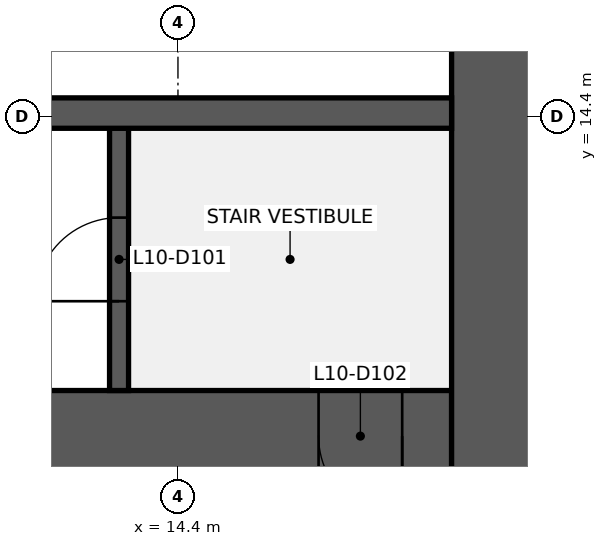
"""IFC4 building model, lengths in metres.
Left out: names, types, materials, properties, quantities, classifications, styles, units other than length and angle.
Written with IfcOpenShell. Run it as: python <this file> out.ifc"""

import sys

from ifc_helpers import new_model, si_unit, direction, frame, frame_2d, origin, place, context, subcontext, project, spatial, rectangle, extrude, element, fill, save


model = new_model("IFC4")
c1 = context("Model", 3, precision=1e-05, world=origin(), true_north=direction((0.0, 1.0)))
c2 = subcontext(c1, "Body", "Model", "MODEL_VIEW")
j1 = project(units=[si_unit("LENGTHUNIT", "METRE"), si_unit("PLANEANGLEUNIT", "RADIAN")], contexts=[c1])
p1 = place(None, origin())
s1 = spatial("IfcSite", under=j1, at=p1, CompositionType="ELEMENT")
p2 = place(p1, origin())
s2 = spatial("IfcBuilding", under=s1, at=p2, CompositionType="ELEMENT")
p3 = place(p2, frame((0.0, 0.0, 51.0)))
s3 = spatial("IfcBuildingStorey", under=s2, at=p3, CompositionType="ELEMENT", Elevation=51.0)
p4 = place(p3, frame((18.0, 10.2, 0.0), z_axis=(0.0, 0.0, 1.0), x_axis=(-1.0, 0.0, 0.0)))
e1 = element("IfcWall", 1, at=p4, inside=s3, PredefinedType="SHEAR", context=c2, shape_type="SweptSolid", body=[
    extrude(rectangle(XDim=13.2, YDim=1.2, at=frame_2d((6.6, 0.0))), origin(), (0.0, 0.0, 1.0), 3.84),
])
p5 = place(p4, frame((0.65, 0.0, 0.0)))
e2 = element("IfcOpeningElement", 2, at=p5, cuts=e1, PredefinedType="OPENING", context=c2, shape_type="SweptSolid", body=[
    extrude(rectangle(XDim=1.1, YDim=2.1, at=frame_2d((0.55, 1.05))), frame((0.0, 0.61, 0.0), z_axis=(0.0, -1.0, 0.0), x_axis=(1.0, 0.0, 0.0)), (0.0, 0.0, 1.0), 1.22),
])
p6 = place(p3, frame((18.6, 38.4, 0.0), z_axis=(0.0, 0.0, 1.0), x_axis=(0.0, -1.0, 0.0)))
e3 = element("IfcWall", 3, at=p6, inside=s3, PredefinedType="SHEAR", context=c2, shape_type="SweptSolid", body=[
    extrude(rectangle(XDim=28.8, YDim=1.2, at=frame_2d((14.4, 0.0))), origin(), (0.0, 0.0, 1.0), 3.84),
])
p7 = place(p6, frame((18.3, 0.0, 0.0)))
e4 = element("IfcOpeningElement", 4, at=p7, cuts=e3, PredefinedType="OPENING", context=c2, shape_type="SweptSolid", body=[
    extrude(rectangle(XDim=1.8, YDim=2.1, at=frame_2d((0.9, 1.05))), frame((0.0, 0.61, 0.0), z_axis=(0.0, -1.0, 0.0), x_axis=(1.0, 0.0, 0.0)), (0.0, 0.0, 1.0), 1.22),
])
p8 = place(p6, frame((8.7, 0.0, 0.0)))
e5 = element("IfcOpeningElement", 5, at=p8, cuts=e3, PredefinedType="OPENING", context=c2, shape_type="SweptSolid", body=[
    extrude(rectangle(XDim=1.8, YDim=2.1, at=frame_2d((0.9, 1.05))), frame((0.0, 0.61, 0.0), z_axis=(0.0, -1.0, 0.0), x_axis=(1.0, 0.0, 0.0)), (0.0, 0.0, 1.0), 1.22),
])
p9 = place(p3, frame((13.625, 10.8, 0.0), z_axis=(0.0, 0.0, 1.0), x_axis=(0.0, 1.0, 0.0)))
e6 = element("IfcWall", 6, at=p9, inside=s3, PredefinedType="SHEAR", context=c2, shape_type="SweptSolid", body=[
    extrude(rectangle(XDim=3.45, YDim=0.25, at=frame_2d((1.725, 0.0))), origin(), (0.0, 0.0, 1.0), 3.84),
])
p10 = place(p9, frame((1.175, 0.0, 0.0)))
e7 = element("IfcOpeningElement", 7, at=p10, cuts=e6, PredefinedType="OPENING", context=c2, shape_type="SweptSolid", body=[
    extrude(rectangle(XDim=1.1, YDim=2.1, at=frame_2d((0.55, 1.05))), frame((0.0, 0.135, 0.0), z_axis=(0.0, -1.0, 0.0), x_axis=(1.0, 0.0, 0.0)), (0.0, 0.0, 1.0), 0.27),
])
p11 = place(p3, frame((1.2, 14.45, 0.0), z_axis=(0.0, 0.0, 1.0), x_axis=(1.0, 0.0, 0.0)))
e8 = element("IfcWall", 8, at=p11, inside=s3, PredefinedType="SHEAR", context=c2, shape_type="SweptSolid", body=[
    extrude(rectangle(XDim=16.8, YDim=0.4, at=frame_2d((8.4, 0.0))), origin(), (0.0, 0.0, 1.0), 3.84),
])
p12 = place(p10, origin())
e9 = element("IfcDoor", 9, at=p12, inside=s3, OperationType="SINGLE_SWING_LEFT", PredefinedType="DOOR", context=c2, shape_type="SweptSolid", body=[
    extrude(rectangle(XDim=1.1, YDim=2.1, at=frame_2d((0.55, 1.05))), frame((0.0, 0.025, 0.0), z_axis=(0.0, -1.0, 0.0), x_axis=(1.0, 0.0, 0.0)), (0.0, 0.0, 1.0), 0.05),
])
fill(e7, e9)
p13 = place(p5, origin())
e10 = element("IfcDoor", 10, at=p13, inside=s3, OperationType="SINGLE_SWING_LEFT", PredefinedType="DOOR", context=c2, shape_type="SweptSolid", body=[
    extrude(rectangle(XDim=1.1, YDim=2.1, at=frame_2d((0.55, 1.05))), frame((0.0, 0.025, 0.0), z_axis=(0.0, -1.0, 0.0), x_axis=(1.0, 0.0, 0.0)), (0.0, 0.0, 1.0), 0.05),
])
fill(e2, e10)
save(model, sys.argv[1])
